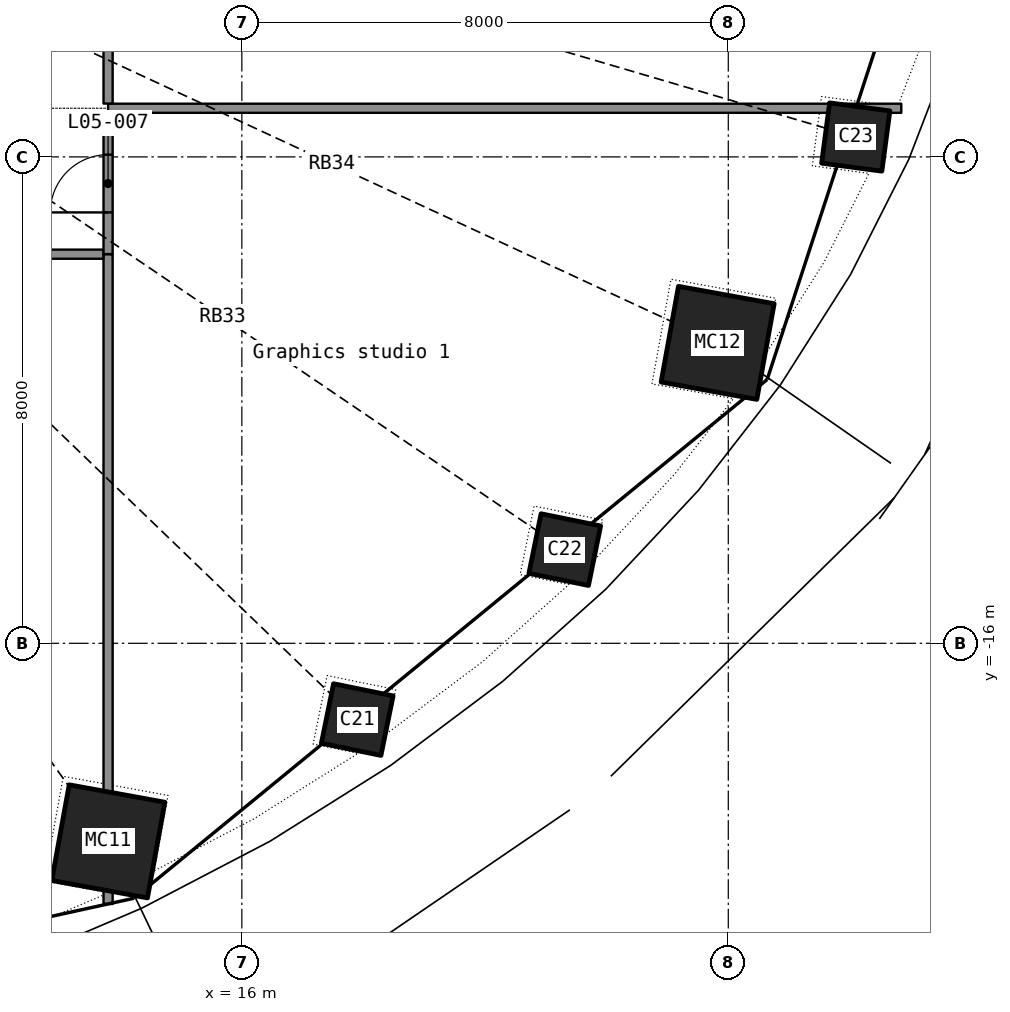
"""IFC4 building model, lengths in metres.
Left out: names, types, materials, properties, quantities, classifications, styles, units other than length and angle.
Written with IfcOpenShell. Run it as: python <this file> out.ifc"""

import sys

from ifc_helpers import new_model, si_unit, direction, frame, frame_2d, origin, origin_2d, place, context, subcontext, project, spatial, rectangle, hollow_rectangle, extrude, element, fill, save


model = new_model("IFC4")
c1 = context("Model", 3, precision=1e-05, world=origin(), true_north=direction((0.0, 1.0)))
c2 = subcontext(c1, "Body", "Model", "MODEL_VIEW")
j1 = project(units=[si_unit("LENGTHUNIT", "METRE"), si_unit("PLANEANGLEUNIT", "RADIAN")], contexts=[c1])
p1 = place(None, origin())
s1 = spatial("IfcSite", under=j1, at=p1, CompositionType="ELEMENT")
p2 = place(p1, origin())
s2 = spatial("IfcBuilding", under=s1, at=p2, CompositionType="ELEMENT")
p3 = place(p2, frame((0.0, 0.0, 28.7)))
s3 = spatial("IfcBuildingStorey", under=s2, at=p3, CompositionType="ELEMENT", Elevation=28.7)
p4 = place(p3, frame((13.804, -19.257, 0.0), z_axis=(-0.017314754, 0.024519551, 0.999549394), x_axis=(-0.906966179, -0.421169101, -0.005379443)))
e1 = element("IfcColumn", 1, at=p4, inside=s3, PredefinedType="COLUMN", context=c2, shape_type="SweptSolid", body=[
    extrude(hollow_rectangle(XDim=1.6, YDim=1.6, WallThickness=0.04, at=origin_2d()), origin(), (0.0, 0.0, 1.0), 4.202),
])
p5 = place(p3, frame((17.898, -17.254, 0.0), z_axis=(-0.022252816, 0.021671802, 0.999517456), x_axis=(-0.826905053, -0.562307187, -0.006217756)))
e2 = element("IfcColumn", 2, at=p5, inside=s3, PredefinedType="COLUMN", context=c2, shape_type="SweptSolid", body=[
    extrude(hollow_rectangle(XDim=1.0, YDim=1.0, WallThickness=0.032, at=origin_2d()), origin(), (0.0, 0.0, 1.0), 4.202),
])
p6 = place(p3, frame((21.311, -14.459, 0.0), z_axis=(-0.026435257, 0.018185133, 0.999485107), x_axis=(-0.719976606, -0.693968674, -0.006416158)))
e3 = element("IfcColumn", 3, at=p6, inside=s3, PredefinedType="COLUMN", context=c2, shape_type="SweptSolid", body=[
    extrude(hollow_rectangle(XDim=1.0, YDim=1.0, WallThickness=0.032, at=origin_2d()), origin(), (0.0, 0.0, 1.0), 4.202),
])
p7 = place(p3, frame((23.825, -11.059, 0.0), z_axis=(-0.029920227, 0.014175797, 0.999451763), x_axis=(-0.582459628, -0.812838162, -0.005907934)))
e4 = element("IfcColumn", 4, at=p7, inside=s3, PredefinedType="COLUMN", context=c2, shape_type="SweptSolid", body=[
    extrude(hollow_rectangle(XDim=1.6, YDim=1.6, WallThickness=0.04, at=origin_2d()), origin(), (0.0, 0.0, 1.0), 4.202),
])
p8 = place(p3, frame((26.096, -7.673, 0.0), z_axis=(-0.032475681, 0.009643941, 0.999425998), x_axis=(-0.40845315, -0.912768366, -0.004464673)))
e5 = element("IfcColumn", 5, at=p8, inside=s3, PredefinedType="COLUMN", context=c2, shape_type="SweptSolid", body=[
    extrude(hollow_rectangle(XDim=1.0, YDim=1.0, WallThickness=0.032, at=origin_2d()), origin(), (0.0, 0.0, 1.0), 4.202),
])
p9 = place(p3, frame((26.845, -7.2, 0.0), z_axis=(0.0, 0.0, 1.0), x_axis=(-1.0, 0.0, 0.0)))
e6 = element("IfcWall", 6, at=p9, inside=s3, PredefinedType="PARTITIONING", context=c2, shape_type="SweptSolid", body=[
    extrude(rectangle(XDim=13.045, YDim=0.15, at=frame_2d((6.522, 0.0))), origin(), (0.0, 0.0, 1.0), 2.8),
])
p10 = place(p3, frame((13.8, -9.6, 0.0), z_axis=(0.0, 0.0, 1.0), x_axis=(0.0, -1.0, 0.0)))
e7 = element("IfcWall", 7, at=p10, inside=s3, PredefinedType="PARTITIONING", context=c2, shape_type="SweptSolid", body=[
    extrude(rectangle(XDim=10.688, YDim=0.15, at=frame_2d((5.344, 0.0))), origin(), (0.0, 0.0, 1.0), 2.8),
])
p11 = place(p3, frame((13.8, -7.123, 0.0), z_axis=(0.0, 0.0, 1.0), x_axis=(0.0, 1.0, 0.0)))
e8 = element("IfcWall", 8, at=p11, inside=s3, PredefinedType="PARTITIONING", context=c2, shape_type="SweptSolid", body=[
    extrude(rectangle(XDim=9.381, YDim=0.15, at=frame_2d((4.69, 0.0))), origin(), (0.0, 0.0, 1.0), 2.8),
])
p12 = place(p11, frame((4.216, 0.0, 0.0)))
e9 = element("IfcOpeningElement", 9, at=p12, cuts=e8, PredefinedType="OPENING", context=c2, shape_type="SweptSolid", body=[
    extrude(rectangle(XDim=0.95, YDim=2.15, at=frame_2d((0.475, 1.075))), frame((0.0, 0.085, 0.0), z_axis=(0.0, -1.0, 0.0), x_axis=(1.0, 0.0, 0.0)), (0.0, 0.0, 1.0), 0.17),
])
p13 = place(p3, frame((7.877, -9.6, 0.0), z_axis=(0.0, 0.0, 1.0), x_axis=(1.0, 0.0, 0.0)))
e10 = element("IfcWall", 10, at=p13, inside=s3, PredefinedType="PARTITIONING", context=c2, shape_type="SweptSolid", body=[
    extrude(rectangle(XDim=5.846, YDim=0.15, at=frame_2d((2.923, 0.0))), origin(), (0.0, 0.0, 1.0), 2.8),
])
p14 = place(p13, frame((2.448, 0.0, 0.0)))
e11 = element("IfcOpeningElement", 11, at=p14, cuts=e10, PredefinedType="OPENING", context=c2, shape_type="SweptSolid", body=[
    extrude(rectangle(XDim=0.95, YDim=2.15, at=frame_2d((0.475, 1.075))), frame((0.0, 0.085, 0.0), z_axis=(0.0, -1.0, 0.0), x_axis=(1.0, 0.0, 0.0)), (0.0, 0.0, 1.0), 0.17),
])
p15 = place(p3, frame((13.8, -9.599, 0.0), z_axis=(0.0, 0.0, 1.0), x_axis=(0.0, 1.0, 0.0)))
e12 = element("IfcWall", 12, at=p15, inside=s3, PredefinedType="PARTITIONING", context=c2, shape_type="SweptSolid", body=[
    extrude(rectangle(XDim=2.322, YDim=0.15, at=frame_2d((1.161, 0.0))), origin(), (0.0, 0.0, 1.0), 2.8),
])
p16 = place(p15, frame((0.686, 0.0, 0.0)))
e13 = element("IfcOpeningElement", 13, at=p16, cuts=e12, PredefinedType="OPENING", context=c2, shape_type="SweptSolid", body=[
    extrude(rectangle(XDim=0.95, YDim=2.15, at=frame_2d((0.475, 1.075))), frame((0.0, 0.085, 0.0), z_axis=(0.0, -1.0, 0.0), x_axis=(1.0, 0.0, 0.0)), (0.0, 0.0, 1.0), 0.17),
])
p17 = place(p16, origin())
e14 = element("IfcDoor", 14, at=p17, inside=s3, OperationType="SINGLE_SWING_LEFT", PredefinedType="DOOR", context=c2, shape_type="SweptSolid", body=[
    extrude(rectangle(XDim=0.95, YDim=2.15, at=frame_2d((0.475, 1.075))), frame((0.0, 0.025, 0.0), z_axis=(0.0, -1.0, 0.0), x_axis=(1.0, 0.0, 0.0)), (0.0, 0.0, 1.0), 0.05),
])
fill(e13, e14)
save(model, sys.argv[1])
